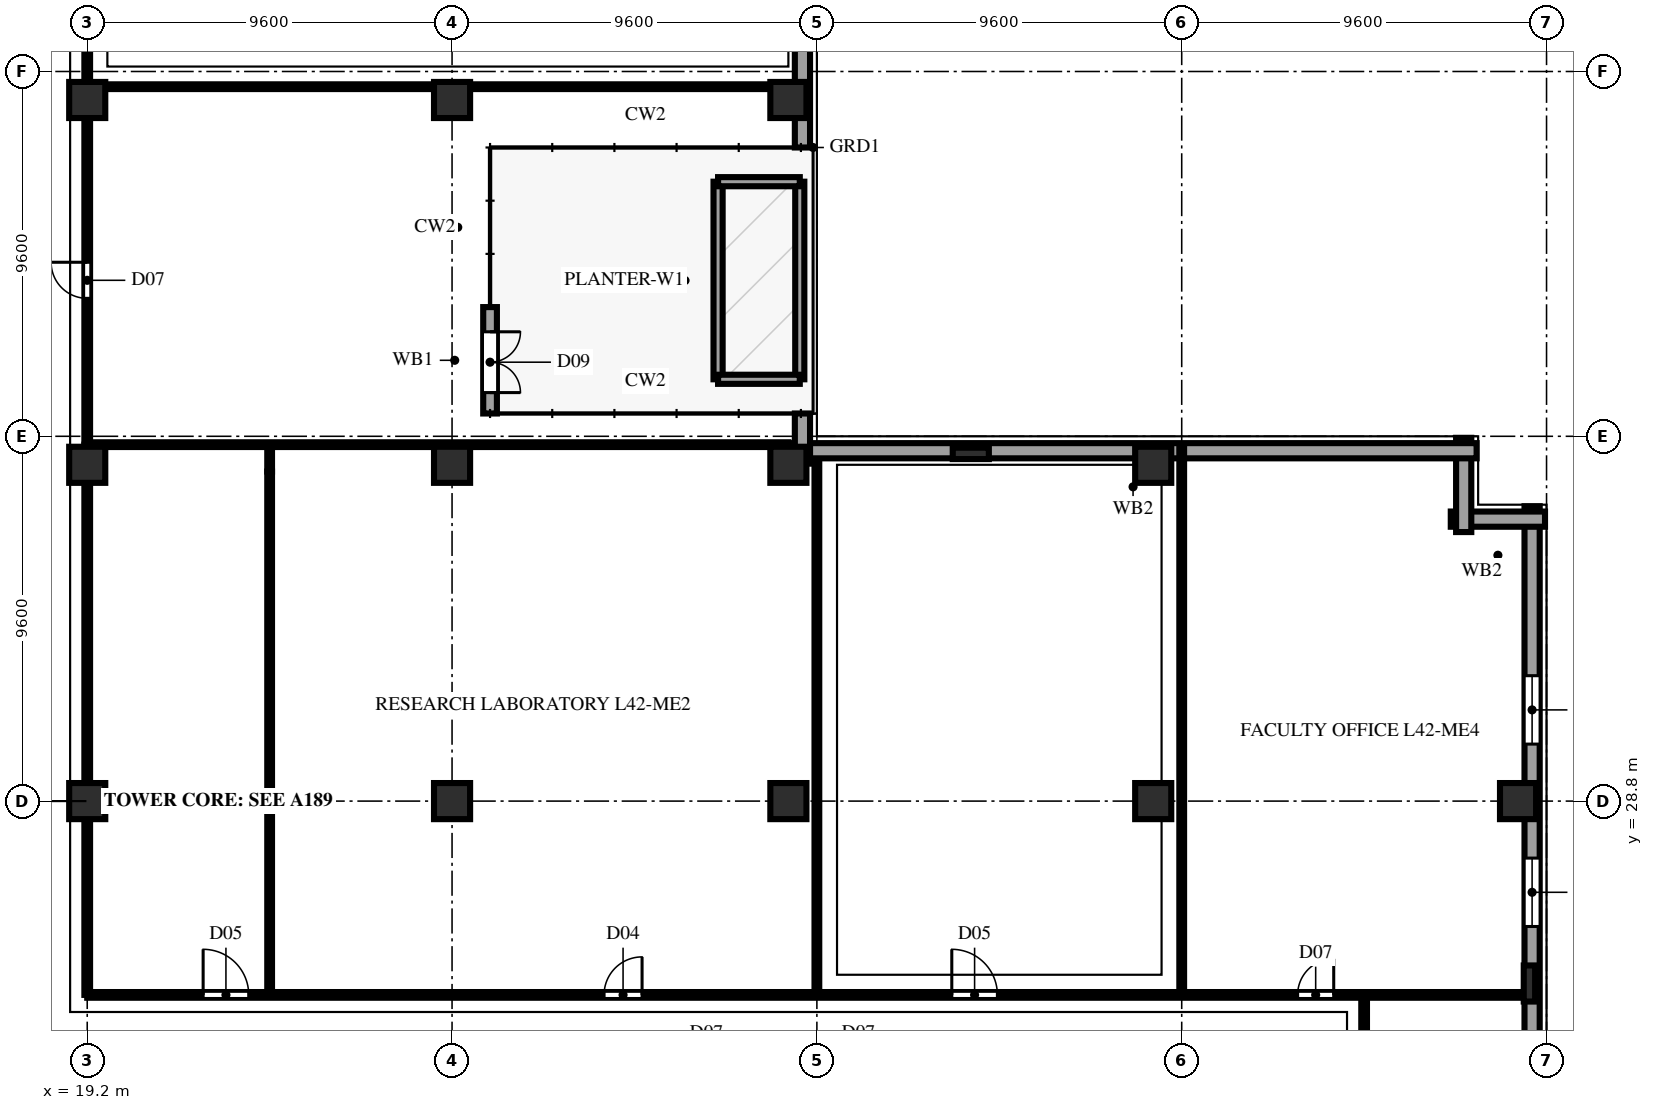
"""IFC4 building model, lengths in metres.
Left out: names, types, materials, properties, quantities, classifications, styles, units other than length and angle.
Written with IfcOpenShell. Run it as: python <this file> out.ifc"""

import sys

from ifc_helpers import new_model, si_unit, direction, frame, frame_2d, origin, origin_2d, place, context, subcontext, project, spatial, rectangle, extrude, element, fill, save


model = new_model("IFC4")
c1 = context("Model", 3, precision=1e-05, world=origin(), true_north=direction((0.0, 1.0)))
c2 = subcontext(c1, "Body", "Model", "MODEL_VIEW")
j1 = project(units=[si_unit("LENGTHUNIT", "METRE"), si_unit("PLANEANGLEUNIT", "RADIAN")], contexts=[c1])
p1 = place(None, origin())
s1 = spatial("IfcSite", under=j1, at=p1, CompositionType="ELEMENT")
p2 = place(p1, origin())
s2 = spatial("IfcBuilding", under=s1, at=p2, CompositionType="ELEMENT")
p3 = place(p2, frame((0.0, 0.0, 167.4)))
s3 = spatial("IfcBuildingStorey", under=s2, at=p3, CompositionType="ELEMENT", Elevation=167.4)
for number, where, z_axis, x_axis in (
    (1, (19.2, 28.8, 0.0), (0.0, 0.0, 1.0), (1.0, 0.0, 0.0)),
    (2, (19.2, 37.65, 0.0), (0.0, 0.0, 1.0), (1.0, 0.0, 0.0)),
    (3, (19.2, 47.25, 0.0), (0.0, 0.0, 1.0), (1.0, 0.0, 0.0)),
    (4, (28.8, 28.8, 0.0), (0.0, 0.0, 1.0), (1.0, 0.0, 0.0)),
    (5, (28.8, 37.65, 0.0), (0.0, 0.0, 1.0), (1.0, 0.0, 0.0)),
    (6, (28.8, 47.25, 0.0), (0.0, 0.0, 1.0), (1.0, 0.0, 0.0)),
    (7, (37.65, 28.8, 0.0), (0.0, 0.0, 1.0), (1.0, 0.0, 0.0)),
    (8, (37.65, 37.65, 0.0), (0.0, 0.0, 1.0), (1.0, 0.0, 0.0)),
    (9, (37.65, 47.25, 0.0), (0.0, 0.0, 1.0), (1.0, 0.0, 0.0)),
    (10, (47.25, 28.8, 0.0), (0.0, 0.0, 1.0), (1.0, 0.0, 0.0)),
    (11, (47.25, 37.65, 0.0), (0.0, 0.0, 1.0), (1.0, 0.0, 0.0)),
    (12, (56.85, 28.8, 0.0), (0.0, 0.0, 1.0), (1.0, 0.0, 0.0)),
):
    element("IfcColumn", number, at=place(p3, frame(where, z_axis=z_axis, x_axis=x_axis)), inside=s3, PredefinedType="COLUMN", context=c2, shape_type="SweptSolid", body=[
        extrude(rectangle(XDim=0.95, YDim=0.95, at=origin_2d()), origin(), (0.0, 0.0, 1.0), 3.8),
    ])
for number, where, z_axis, x_axis in (
    (13, (57.15, 24.0, 0.0), (0.0, 0.0, 1.0), (0.0, 1.0, 0.0)),
    (14, (42.45, 37.95, 0.0), (0.0, 0.0, 1.0), (1.0, 0.0, 0.0)),
):
    element("IfcColumn", number, at=place(p3, frame(where, z_axis=z_axis, x_axis=x_axis)), inside=s3, PredefinedType="PILASTER", context=c2, shape_type="SweptSolid", body=[
        extrude(rectangle(XDim=0.95, YDim=0.3, at=origin_2d()), origin(), (0.0, 0.0, 1.0), 3.8),
    ])
p4 = place(p3, frame((57.22, 1.84, 0.0), z_axis=(0.0, 0.0, 1.0), x_axis=(0.0, 1.0, 0.0)))
e15 = element("IfcWall", 15, at=p4, inside=s3, PredefinedType="SOLIDWALL", context=c2, shape_type="SweptSolid", body=[
    extrude(rectangle(XDim=34.72, YDim=0.4, at=frame_2d((17.36, 0.0))), origin(), (0.0, 0.0, 1.0), 3.54),
])
p5 = place(p4, frame((4.46, 0.0, 0.85)))
e16 = element("IfcOpeningElement", 16, at=p5, cuts=e15, PredefinedType="OPENING", context=c2, shape_type="SweptSolid", body=[
    extrude(rectangle(XDim=1.8, YDim=1.85, at=frame_2d((0.9, 0.925))), frame((0.0, 0.212, 0.0), z_axis=(0.0, -1.0, 0.0), x_axis=(1.0, 0.0, 0.0)), (0.0, 0.0, 1.0), 0.424),
])
p6 = place(p4, frame((9.26, 0.0, 0.85)))
e17 = element("IfcOpeningElement", 17, at=p6, cuts=e15, PredefinedType="OPENING", context=c2, shape_type="SweptSolid", body=[
    extrude(rectangle(XDim=1.8, YDim=1.85, at=frame_2d((0.9, 0.925))), frame((0.0, 0.212, 0.0), z_axis=(0.0, -1.0, 0.0), x_axis=(1.0, 0.0, 0.0)), (0.0, 0.0, 1.0), 0.424),
])
p7 = place(p4, frame((14.06, 0.0, 0.85)))
e18 = element("IfcOpeningElement", 18, at=p7, cuts=e15, PredefinedType="OPENING", context=c2, shape_type="SweptSolid", body=[
    extrude(rectangle(XDim=1.8, YDim=1.85, at=frame_2d((0.9, 0.925))), frame((0.0, 0.212, 0.0), z_axis=(0.0, -1.0, 0.0), x_axis=(1.0, 0.0, 0.0)), (0.0, 0.0, 1.0), 0.424),
])
p8 = place(p4, frame((23.66, 0.0, 0.85)))
e19 = element("IfcOpeningElement", 19, at=p8, cuts=e15, PredefinedType="OPENING", context=c2, shape_type="SweptSolid", body=[
    extrude(rectangle(XDim=1.8, YDim=1.85, at=frame_2d((0.9, 0.925))), frame((0.0, 0.212, 0.0), z_axis=(0.0, -1.0, 0.0), x_axis=(1.0, 0.0, 0.0)), (0.0, 0.0, 1.0), 0.424),
])
p9 = place(p4, frame((28.46, 0.0, 0.85)))
e20 = element("IfcOpeningElement", 20, at=p9, cuts=e15, PredefinedType="OPENING", context=c2, shape_type="SweptSolid", body=[
    extrude(rectangle(XDim=1.8, YDim=1.85, at=frame_2d((0.9, 0.925))), frame((0.0, 0.212, 0.0), z_axis=(0.0, -1.0, 0.0), x_axis=(1.0, 0.0, 0.0)), (0.0, 0.0, 1.0), 0.424),
])
p10 = place(p3, frame((57.56, 36.22, 0.0), z_axis=(0.0, 0.0, 1.0), x_axis=(-1.0, 0.0, 0.0)))
e21 = element("IfcWall", 21, at=p10, inside=s3, PredefinedType="SOLIDWALL", context=c2, shape_type="SweptSolid", body=[
    extrude(rectangle(XDim=2.48, YDim=0.4, at=frame_2d((1.24, 0.0))), origin(), (0.0, 0.0, 1.0), 3.54),
])
p11 = place(p3, frame((55.42, 35.88, 0.0), z_axis=(0.0, 0.0, 1.0), x_axis=(0.0, 1.0, 0.0)))
e22 = element("IfcWall", 22, at=p11, inside=s3, PredefinedType="SOLIDWALL", context=c2, shape_type="SweptSolid", body=[
    extrude(rectangle(XDim=2.48, YDim=0.4, at=frame_2d((1.24, 0.0))), origin(), (0.0, 0.0, 1.0), 3.54),
])
p12 = place(p3, frame((55.76, 38.02, 0.0), z_axis=(0.0, 0.0, 1.0), x_axis=(-1.0, 0.0, 0.0)))
e23 = element("IfcWall", 23, at=p12, inside=s3, PredefinedType="SOLIDWALL", context=c2, shape_type="SweptSolid", body=[
    extrude(rectangle(XDim=18.08, YDim=0.4, at=frame_2d((9.04, 0.0))), origin(), (0.0, 0.0, 1.0), 3.54),
])
p13 = place(p3, frame((38.02, 37.68, 0.0), z_axis=(0.0, 0.0, 1.0), x_axis=(0.0, 1.0, 0.0)))
e24 = element("IfcWall", 24, at=p13, inside=s3, PredefinedType="SOLIDWALL", context=c2, shape_type="SweptSolid", body=[
    extrude(rectangle(XDim=1.32, YDim=0.4, at=frame_2d((0.66, 0.0))), origin(), (0.0, 0.0, 1.0), 3.54),
])
p14 = place(p3, frame((38.02, 46.0, 0.0), z_axis=(0.0, 0.0, 1.0), x_axis=(0.0, 1.0, 0.0)))
e25 = element("IfcWall", 25, at=p14, inside=s3, PredefinedType="SOLIDWALL", context=c2, shape_type="SweptSolid", body=[
    extrude(rectangle(XDim=19.36, YDim=0.4, at=frame_2d((9.68, 0.0))), origin(), (0.0, 0.0, 1.0), 3.54),
])
p15 = place(p3, frame((29.8, 39.0, 0.0), z_axis=(0.0, 0.0, 1.0), x_axis=(0.0, 1.0, 0.0)))
e26 = element("IfcWall", 26, at=p15, inside=s3, PredefinedType="SOLIDWALL", context=c2, shape_type="SweptSolid", body=[
    extrude(rectangle(XDim=2.8, YDim=0.36, at=frame_2d((1.4, 0.0))), origin(), (0.0, 0.0, 1.0), 3.54),
])
p16 = place(p15, frame((0.55, 0.0, 0.0)))
e27 = element("IfcOpeningElement", 27, at=p16, cuts=e26, PredefinedType="OPENING", context=c2, shape_type="SweptSolid", body=[
    extrude(rectangle(XDim=1.6, YDim=2.3, at=frame_2d((0.8, 1.15))), frame((0.0, 0.192, 0.0), z_axis=(0.0, -1.0, 0.0), x_axis=(1.0, 0.0, 0.0)), (0.0, 0.0, 1.0), 0.384),
])
for number, where, z_axis, x_axis in (
    (28, (35.8, 39.9, 0.0), (0.0, 0.0, 1.0), (0.0, 1.0, 0.0)),
    (29, (37.95, 39.9, 0.0), (0.0, 0.0, 1.0), (0.0, 1.0, 0.0)),
):
    element("IfcWall", number, at=place(p3, frame(where, z_axis=z_axis, x_axis=x_axis)), inside=s3, PredefinedType="USERDEFINED", context=c2, shape_type="SweptSolid", body=[
        extrude(rectangle(XDim=5.2, YDim=0.24, at=frame_2d((2.6, 0.0))), origin(), (0.0, 0.0, 1.0), 0.62),
    ])
for number, where, z_axis, x_axis in (
    (30, (35.8, 39.9, 0.0), (0.0, 0.0, 1.0), (1.0, 0.0, 0.0)),
    (31, (35.8, 45.1, 0.0), (0.0, 0.0, 1.0), (1.0, 0.0, 0.0)),
):
    element("IfcWall", number, at=place(p3, frame(where, z_axis=z_axis, x_axis=x_axis)), inside=s3, PredefinedType="USERDEFINED", context=c2, shape_type="SweptSolid", body=[
        extrude(rectangle(XDim=2.15, YDim=0.24, at=frame_2d((1.075, 0.0))), origin(), (0.0, 0.0, 1.0), 0.62),
    ])
p17 = place(p3, frame((52.8, 21.6, 0.0), z_axis=(0.0, 0.0, 1.0), x_axis=(0.0, 1.0, 0.0)))
e32 = element("IfcWall", 32, at=p17, inside=s3, PredefinedType="PARTITIONING", context=c2, shape_type="SweptSolid", body=[
    extrude(rectangle(XDim=2.1, YDim=0.15, at=frame_2d((1.05, 0.0))), origin(), (0.0, 0.0, 1.0), 3.54),
])
p18 = place(p3, frame((24.0, 23.7, 0.0), z_axis=(0.0, 0.0, 1.0), x_axis=(0.0, 1.0, 0.0)))
e33 = element("IfcWall", 33, at=p18, inside=s3, PredefinedType="PARTITIONING", context=c2, shape_type="SweptSolid", body=[
    extrude(rectangle(XDim=4.923, YDim=0.125, at=frame_2d((2.461, 0.0))), origin(), (0.0, 0.0, 1.0), 2.996),
])
p19 = place(p3, frame((24.0, 28.623, 0.0), z_axis=(0.0, 0.0, 1.0), x_axis=(0.0, 1.0, 0.0)))
e34 = element("IfcWall", 34, at=p19, inside=s3, PredefinedType="PARTITIONING", context=c2, shape_type="SweptSolid", body=[
    extrude(rectangle(XDim=0.355, YDim=0.125, at=frame_2d((0.177, 0.0))), origin(), (0.0, 0.0, 1.0), 3.54),
])
p20 = place(p3, frame((24.0, 28.978, 0.0), z_axis=(0.0, 0.0, 1.0), x_axis=(0.0, 1.0, 0.0)))
e35 = element("IfcWall", 35, at=p20, inside=s3, PredefinedType="PARTITIONING", context=c2, shape_type="SweptSolid", body=[
    extrude(rectangle(XDim=8.495, YDim=0.125, at=frame_2d((4.248, 0.0))), origin(), (0.0, 0.0, 1.0), 2.996),
])
p21 = place(p3, frame((24.0, 37.472, 0.0), z_axis=(0.0, 0.0, 1.0), x_axis=(0.0, 1.0, 0.0)))
e36 = element("IfcWall", 36, at=p21, inside=s3, PredefinedType="PARTITIONING", context=c2, shape_type="SweptSolid", body=[
    extrude(rectangle(XDim=0.708, YDim=0.125, at=frame_2d((0.354, 0.0))), origin(), (0.0, 0.0, 1.0), 3.54),
])
p22 = place(p3, frame((38.4, 23.7, 0.0), z_axis=(0.0, 0.0, 1.0), x_axis=(0.0, 1.0, 0.0)))
e37 = element("IfcWall", 37, at=p22, inside=s3, PredefinedType="PARTITIONING", context=c2, shape_type="SweptSolid", body=[
    extrude(rectangle(XDim=14.09, YDim=0.125, at=frame_2d((7.045, 0.0))), origin(), (0.0, 0.0, 1.0), 3.54),
])
p23 = place(p3, frame((48.0, 23.7, 0.0), z_axis=(0.0, 0.0, 1.0), x_axis=(0.0, 1.0, 0.0)))
e38 = element("IfcWall", 38, at=p23, inside=s3, PredefinedType="PARTITIONING", context=c2, shape_type="SweptSolid", body=[
    extrude(rectangle(XDim=14.48, YDim=0.125, at=frame_2d((7.24, 0.0))), origin(), (0.0, 0.0, 1.0), 3.54),
])
p24 = place(p3, frame((19.2, 23.7, 0.0), z_axis=(0.0, 0.0, 1.0), x_axis=(1.0, 0.0, 0.0)))
e39 = element("IfcWall", 39, at=p24, inside=s3, PredefinedType="PARTITIONING", context=c2, shape_type="SweptSolid", body=[
    extrude(rectangle(XDim=38.18, YDim=0.15, at=frame_2d((19.09, 0.0))), origin(), (0.0, 0.0, 1.0), 3.54),
])
p25 = place(p24, frame((3.05, 0.0, 0.0)))
e40 = element("IfcOpeningElement", 40, at=p25, cuts=e39, PredefinedType="OPENING", context=c2, shape_type="SweptSolid", body=[
    extrude(rectangle(XDim=1.2, YDim=2.2, at=frame_2d((0.6, 1.1))), frame((0.0, 0.087, 0.0), z_axis=(0.0, -1.0, 0.0), x_axis=(1.0, 0.0, 0.0)), (0.0, 0.0, 1.0), 0.174),
])
p26 = place(p24, frame((13.6, 0.0, 0.0)))
e41 = element("IfcOpeningElement", 41, at=p26, cuts=e39, PredefinedType="OPENING", context=c2, shape_type="SweptSolid", body=[
    extrude(rectangle(XDim=1.0, YDim=2.2, at=frame_2d((0.5, 1.1))), frame((0.0, 0.087, 0.0), z_axis=(0.0, -1.0, 0.0), x_axis=(1.0, 0.0, 0.0)), (0.0, 0.0, 1.0), 0.174),
])
p27 = place(p24, frame((22.75, 0.0, 0.0)))
e42 = element("IfcOpeningElement", 42, at=p27, cuts=e39, PredefinedType="OPENING", context=c2, shape_type="SweptSolid", body=[
    extrude(rectangle(XDim=1.2, YDim=2.2, at=frame_2d((0.6, 1.1))), frame((0.0, 0.087, 0.0), z_axis=(0.0, -1.0, 0.0), x_axis=(1.0, 0.0, 0.0)), (0.0, 0.0, 1.0), 0.174),
])
p28 = place(p24, frame((31.85, 0.0, 0.0)))
e43 = element("IfcOpeningElement", 43, at=p28, cuts=e39, PredefinedType="OPENING", context=c2, shape_type="SweptSolid", body=[
    extrude(rectangle(XDim=0.95, YDim=2.15, at=frame_2d((0.475, 1.075))), frame((0.0, 0.087, 0.0), z_axis=(0.0, -1.0, 0.0), x_axis=(1.0, 0.0, 0.0)), (0.0, 0.0, 1.0), 0.174),
])
p29 = place(p3, frame((19.2, 23.7, 0.0), z_axis=(0.0, 0.0, 1.0), x_axis=(0.0, 1.0, 0.0)))
e44 = element("IfcWall", 44, at=p29, inside=s3, PredefinedType="PARTITIONING", context=c2, shape_type="SweptSolid", body=[
    extrude(rectangle(XDim=14.48, YDim=0.15, at=frame_2d((7.24, 0.0))), origin(), (0.0, 0.0, 1.0), 2.845),
])
p30 = place(p3, frame((19.28, 38.18, 0.0), z_axis=(0.0, 0.0, 1.0), x_axis=(1.0, 0.0, 0.0)))
e45 = element("IfcWall", 45, at=p30, inside=s3, PredefinedType="PARTITIONING", context=c2, shape_type="SweptSolid", body=[
    extrude(rectangle(XDim=18.37, YDim=0.125, at=frame_2d((9.185, 0.0))), origin(), (0.0, 0.0, 1.0), 3.54),
])
p31 = place(p3, frame((19.2, 38.18, 0.0), z_axis=(0.0, 0.0, 1.0), x_axis=(0.0, 1.0, 0.0)))
e46 = element("IfcWall", 46, at=p31, inside=s3, PredefinedType="PARTITIONING", context=c2, shape_type="SweptSolid", body=[
    extrude(rectangle(XDim=9.07, YDim=0.15, at=frame_2d((4.535, 0.0))), origin(), (0.0, 0.0, 1.0), 2.845),
])
p32 = place(p31, frame((3.85, 0.0, 0.0)))
e47 = element("IfcOpeningElement", 47, at=p32, cuts=e46, PredefinedType="OPENING", context=c2, shape_type="SweptSolid", body=[
    extrude(rectangle(XDim=0.95, YDim=2.15, at=frame_2d((0.475, 1.075))), frame((0.0, 0.087, 0.0), z_axis=(0.0, -1.0, 0.0), x_axis=(1.0, 0.0, 0.0)), (0.0, 0.0, 1.0), 0.174),
])
p33 = place(p3, frame((19.2, 47.25, 0.0), z_axis=(0.0, 0.0, 1.0), x_axis=(0.0, 1.0, 0.0)))
e48 = element("IfcWall", 48, at=p33, inside=s3, PredefinedType="PARTITIONING", context=c2, shape_type="SweptSolid", body=[
    extrude(rectangle(XDim=0.35, YDim=0.15, at=frame_2d((0.175, 0.0))), origin(), (0.0, 0.0, 1.0), 3.54),
])
p34 = place(p3, frame((19.2, 47.6, 0.0), z_axis=(0.0, 0.0, 1.0), x_axis=(1.0, 0.0, 0.0)))
e49 = element("IfcWall", 49, at=p34, inside=s3, PredefinedType="PARTITIONING", context=c2, shape_type="SweptSolid", body=[
    extrude(rectangle(XDim=18.98, YDim=0.125, at=frame_2d((9.49, 0.0))), origin(), (0.0, 0.0, 1.0), 3.54),
])
p35 = place(p3, frame((19.2, 47.6, 0.0), z_axis=(0.0, 0.0, 1.0), x_axis=(0.0, 1.0, 0.0)))
e50 = element("IfcWall", 50, at=p35, inside=s3, PredefinedType="PARTITIONING", context=c2, shape_type="SweptSolid", body=[
    extrude(rectangle(XDim=18.85, YDim=0.15, at=frame_2d((9.425, 0.0))), origin(), (0.0, 0.0, 1.0), 2.845),
])
p36 = place(p35, frame((3.95, 0.0, 0.0)))
e51 = element("IfcOpeningElement", 51, at=p36, cuts=e50, PredefinedType="OPENING", context=c2, shape_type="SweptSolid", body=[
    extrude(rectangle(XDim=1.0, YDim=2.2, at=frame_2d((0.5, 1.1))), frame((0.0, 0.087, 0.0), z_axis=(0.0, -1.0, 0.0), x_axis=(1.0, 0.0, 0.0)), (0.0, 0.0, 1.0), 0.174),
])
p37 = place(p8, origin())
e52 = element("IfcWindow", 52, at=p37, inside=s3, PartitioningType="DOUBLE_PANEL_VERTICAL", PredefinedType="WINDOW", context=c2, shape_type="SweptSolid", body=[
    extrude(rectangle(XDim=1.8, YDim=1.85, at=frame_2d((0.9, 0.925))), frame((0.0, 0.11, 0.0), z_axis=(0.0, -1.0, 0.0), x_axis=(1.0, 0.0, 0.0)), (0.0, 0.0, 1.0), 0.06),
])
fill(e19, e52)
p38 = place(p9, origin())
e53 = element("IfcWindow", 53, at=p38, inside=s3, PartitioningType="DOUBLE_PANEL_VERTICAL", PredefinedType="WINDOW", context=c2, shape_type="SweptSolid", body=[
    extrude(rectangle(XDim=1.8, YDim=1.85, at=frame_2d((0.9, 0.925))), frame((0.0, 0.11, 0.0), z_axis=(0.0, -1.0, 0.0), x_axis=(1.0, 0.0, 0.0)), (0.0, 0.0, 1.0), 0.06),
])
fill(e20, e53)
p39 = place(p16, frame((1.6, 0.0, 0.0), z_axis=(0.0, 0.0, 1.0), x_axis=(-1.0, 0.0, 0.0)))
e54 = element("IfcDoor", 54, at=p39, inside=s3, OperationType="DOUBLE_SWING_LEFT", PredefinedType="DOOR", context=c2, shape_type="SweptSolid", body=[
    extrude(rectangle(XDim=1.6, YDim=2.3, at=frame_2d((0.8, 1.15))), frame((0.0, 0.025, 0.0), z_axis=(0.0, -1.0, 0.0), x_axis=(1.0, 0.0, 0.0)), (0.0, 0.0, 1.0), 0.05),
])
fill(e27, e54)
p40 = place(p25, origin())
e55 = element("IfcDoor", 55, at=p40, inside=s3, OperationType="SINGLE_SWING_LEFT", PredefinedType="DOOR", context=c2, shape_type="SweptSolid", body=[
    extrude(rectangle(XDim=1.2, YDim=2.2, at=frame_2d((0.6, 1.1))), frame((0.0, 0.025, 0.0), z_axis=(0.0, -1.0, 0.0), x_axis=(1.0, 0.0, 0.0)), (0.0, 0.0, 1.0), 0.05),
])
fill(e40, e55)
p41 = place(p26, origin())
e56 = element("IfcDoor", 56, at=p41, inside=s3, OperationType="SINGLE_SWING_RIGHT", PredefinedType="DOOR", context=c2, shape_type="SweptSolid", body=[
    extrude(rectangle(XDim=1.0, YDim=2.2, at=frame_2d((0.5, 1.1))), frame((0.0, 0.025, 0.0), z_axis=(0.0, -1.0, 0.0), x_axis=(1.0, 0.0, 0.0)), (0.0, 0.0, 1.0), 0.05),
])
fill(e41, e56)
p42 = place(p27, origin())
e57 = element("IfcDoor", 57, at=p42, inside=s3, OperationType="SINGLE_SWING_LEFT", PredefinedType="DOOR", context=c2, shape_type="SweptSolid", body=[
    extrude(rectangle(XDim=1.2, YDim=2.2, at=frame_2d((0.6, 1.1))), frame((0.0, 0.025, 0.0), z_axis=(0.0, -1.0, 0.0), x_axis=(1.0, 0.0, 0.0)), (0.0, 0.0, 1.0), 0.05),
])
fill(e42, e57)
p43 = place(p28, origin())
e58 = element("IfcDoor", 58, at=p43, inside=s3, OperationType="SINGLE_SWING_RIGHT", PredefinedType="DOOR", context=c2, shape_type="SweptSolid", body=[
    extrude(rectangle(XDim=0.95, YDim=2.15, at=frame_2d((0.475, 1.075))), frame((0.0, 0.025, 0.0), z_axis=(0.0, -1.0, 0.0), x_axis=(1.0, 0.0, 0.0)), (0.0, 0.0, 1.0), 0.05),
])
fill(e43, e58)
p44 = place(p32, origin())
e59 = element("IfcDoor", 59, at=p44, inside=s3, OperationType="SINGLE_SWING_RIGHT", PredefinedType="DOOR", context=c2, shape_type="SweptSolid", body=[
    extrude(rectangle(XDim=0.95, YDim=2.15, at=frame_2d((0.475, 1.075))), frame((0.0, 0.025, 0.0), z_axis=(0.0, -1.0, 0.0), x_axis=(1.0, 0.0, 0.0)), (0.0, 0.0, 1.0), 0.05),
])
fill(e47, e59)
save(model, sys.argv[1])
